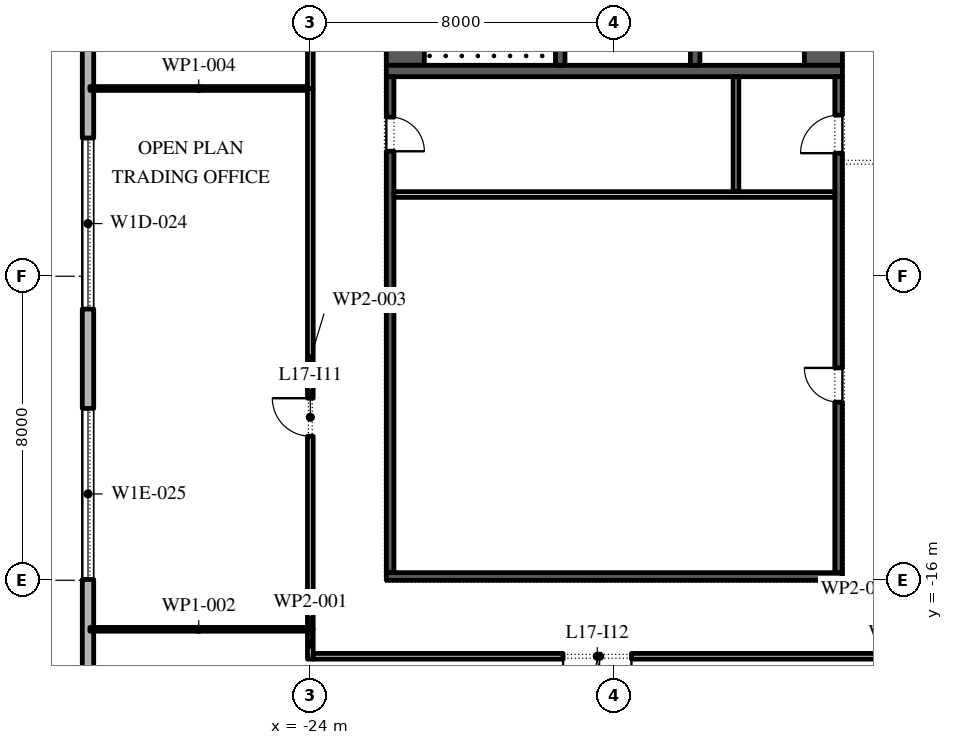
"""IFC4 building model, lengths in metres.
Left out: names, types, materials, properties, quantities, classifications, styles, units other than length and angle.
Written with IfcOpenShell. Run it as: python <this file> out.ifc"""

import sys

from ifc_helpers import new_model, si_unit, direction, frame, frame_2d, origin, place, context, subcontext, project, spatial, rectangle, extrude, element, fill, save


model = new_model("IFC4")
c1 = context("Model", 3, precision=1e-05, world=origin(), true_north=direction((0.0, 1.0)))
c2 = subcontext(c1, "Body", "Model", "MODEL_VIEW")
j1 = project(units=[si_unit("LENGTHUNIT", "METRE"), si_unit("PLANEANGLEUNIT", "RADIAN")], contexts=[c1])
p1 = place(None, origin())
s1 = spatial("IfcSite", under=j1, at=p1, CompositionType="ELEMENT")
p2 = place(p1, origin())
s2 = spatial("IfcBuilding", under=s1, at=p2, CompositionType="ELEMENT")
p3 = place(p2, frame((0.0, 0.0, 81.6)))
s3 = spatial("IfcBuildingStorey", under=s2, at=p3, CompositionType="ELEMENT", Elevation=81.6)
p4 = place(p3, frame((-29.85, 25.1, 0.0), z_axis=(0.0, 0.0, 1.0), x_axis=(0.0, -1.0, 0.0)))
e1 = element("IfcWall", 1, at=p4, inside=s3, PredefinedType="STANDARD", context=c2, shape_type="SweptSolid", body=[
    extrude(rectangle(XDim=49.5, YDim=0.3, at=frame_2d((24.75, 0.0))), origin(), (0.0, 0.0, 1.0), 4.0),
])
p5 = place(p4, frame((1.157, 0.0, 0.45)))
e2 = element("IfcOpeningElement", 2, at=p5, cuts=e1, PredefinedType="OPENING", context=c2, shape_type="SweptSolid", body=[
    extrude(rectangle(XDim=4.5, YDim=2.875, at=frame_2d((2.25, 1.438))), frame((0.0, 0.16, 0.0), z_axis=(0.0, -1.0, 0.0), x_axis=(1.0, 0.0, 0.0)), (0.0, 0.0, 1.0), 0.32),
])
p6 = place(p4, frame((8.121, 0.0, 0.45)))
e3 = element("IfcOpeningElement", 3, at=p6, cuts=e1, PredefinedType="OPENING", context=c2, shape_type="SweptSolid", body=[
    extrude(rectangle(XDim=4.5, YDim=3.05, at=frame_2d((2.25, 1.525))), frame((0.0, 0.16, 0.0), z_axis=(0.0, -1.0, 0.0), x_axis=(1.0, 0.0, 0.0)), (0.0, 0.0, 1.0), 0.32),
])
p7 = place(p4, frame((16.286, 0.0, 0.0)))
e4 = element("IfcOpeningElement", 4, at=p7, cuts=e1, PredefinedType="OPENING", context=c2, shape_type="SweptSolid", body=[
    extrude(rectangle(XDim=2.4, YDim=3.325, at=frame_2d((1.2, 1.663))), frame((0.0, 0.16, 0.0), z_axis=(0.0, -1.0, 0.0), x_axis=(1.0, 0.0, 0.0)), (0.0, 0.0, 1.0), 0.32),
])
p8 = place(p4, frame((22.35, 0.0, 0.45)))
e5 = element("IfcOpeningElement", 5, at=p8, cuts=e1, PredefinedType="OPENING", context=c2, shape_type="SweptSolid", body=[
    extrude(rectangle(XDim=4.5, YDim=2.875, at=frame_2d((2.25, 1.438))), frame((0.0, 0.16, 0.0), z_axis=(0.0, -1.0, 0.0), x_axis=(1.0, 0.0, 0.0)), (0.0, 0.0, 1.0), 0.32),
])
p9 = place(p4, frame((29.464, 0.0, 0.45)))
e6 = element("IfcOpeningElement", 6, at=p9, cuts=e1, PredefinedType="OPENING", context=c2, shape_type="SweptSolid", body=[
    extrude(rectangle(XDim=4.5, YDim=2.875, at=frame_2d((2.25, 1.438))), frame((0.0, 0.16, 0.0), z_axis=(0.0, -1.0, 0.0), x_axis=(1.0, 0.0, 0.0)), (0.0, 0.0, 1.0), 0.32),
])
p10 = place(p4, frame((36.579, 0.0, 0.45)))
e7 = element("IfcOpeningElement", 7, at=p10, cuts=e1, PredefinedType="OPENING", context=c2, shape_type="SweptSolid", body=[
    extrude(rectangle(XDim=4.5, YDim=2.825, at=frame_2d((2.25, 1.413))), frame((0.0, 0.16, 0.0), z_axis=(0.0, -1.0, 0.0), x_axis=(1.0, 0.0, 0.0)), (0.0, 0.0, 1.0), 0.32),
])
p11 = place(p4, frame((44.743, 0.0, 0.0)))
e8 = element("IfcOpeningElement", 8, at=p11, cuts=e1, PredefinedType="OPENING", context=c2, shape_type="SweptSolid", body=[
    extrude(rectangle(XDim=2.4, YDim=3.5, at=frame_2d((1.2, 1.75))), frame((0.0, 0.16, 0.0), z_axis=(0.0, -1.0, 0.0), x_axis=(1.0, 0.0, 0.0)), (0.0, 0.0, 1.0), 0.32),
])
p12 = place(p3, frame((-21.5, -2.45, 0.0), z_axis=(0.0, 0.0, 1.0), x_axis=(0.0, 1.0, 0.0)))
e9 = element("IfcWall", 9, at=p12, inside=s3, PredefinedType="SHEAR", context=c2, shape_type="SweptSolid", body=[
    extrude(rectangle(XDim=27.9, YDim=1.0, at=frame_2d((13.95, 0.0))), origin(), (0.0, 0.0, 1.0), 4.0),
])
p13 = place(p12, frame((5.05, 0.0, 0.0)))
e10 = element("IfcOpeningElement", 10, at=p13, cuts=e9, PredefinedType="OPENING", context=c2, shape_type="SweptSolid", body=[
    extrude(rectangle(XDim=1.2, YDim=2.1, at=frame_2d((0.6, 1.05))), frame((0.0, 0.51, 0.0), z_axis=(0.0, -1.0, 0.0), x_axis=(1.0, 0.0, 0.0)), (0.0, 0.0, 1.0), 1.02),
])
p14 = place(p12, frame((21.65, 0.0, 0.0)))
e11 = element("IfcOpeningElement", 11, at=p14, cuts=e9, PredefinedType="OPENING", context=c2, shape_type="SweptSolid", body=[
    extrude(rectangle(XDim=1.2, YDim=2.1, at=frame_2d((0.6, 1.05))), frame((0.0, 0.51, 0.0), z_axis=(0.0, -1.0, 0.0), x_axis=(1.0, 0.0, 0.0)), (0.0, 0.0, 1.0), 1.02),
])
p15 = place(p3, frame((-10.5, -2.45, 0.0), z_axis=(0.0, 0.0, 1.0), x_axis=(0.0, 1.0, 0.0)))
e12 = element("IfcWall", 12, at=p15, inside=s3, PredefinedType="SHEAR", context=c2, shape_type="SweptSolid", body=[
    extrude(rectangle(XDim=27.9, YDim=1.0, at=frame_2d((13.95, 0.0))), origin(), (0.0, 0.0, 1.0), 4.0),
])
p16 = place(p15, frame((23.65, 0.0, 0.0)))
e13 = element("IfcOpeningElement", 13, at=p16, cuts=e12, PredefinedType="OPENING", context=c2, shape_type="SweptSolid", body=[
    extrude(rectangle(XDim=2.4, YDim=2.1, at=frame_2d((1.2, 1.05))), frame((0.0, 0.51, 0.0), z_axis=(0.0, -1.0, 0.0), x_axis=(1.0, 0.0, 0.0)), (0.0, 0.0, 1.0), 1.02),
])
p17 = place(p15, frame((1.387, 0.0, 0.0)))
e14 = element("IfcOpeningElement", 14, at=p17, cuts=e12, PredefinedType="OPENING", context=c2, shape_type="SweptSolid", body=[
    extrude(rectangle(XDim=0.9, YDim=2.1, at=frame_2d((0.45, 1.05))), frame((0.0, 0.51, 0.0), z_axis=(0.0, -1.0, 0.0), x_axis=(1.0, 0.0, 0.0)), (0.0, 0.0, 1.0), 1.02),
])
p18 = place(p15, frame((4.613, 0.0, 0.0)))
e15 = element("IfcOpeningElement", 15, at=p18, cuts=e12, PredefinedType="OPENING", context=c2, shape_type="SweptSolid", body=[
    extrude(rectangle(XDim=0.9, YDim=2.1, at=frame_2d((0.45, 1.05))), frame((0.0, 0.51, 0.0), z_axis=(0.0, -1.0, 0.0), x_axis=(1.0, 0.0, 0.0)), (0.0, 0.0, 1.0), 1.02),
])
p19 = place(p3, frame((-22.0, -2.6, 0.0), z_axis=(0.0, 0.0, 1.0), x_axis=(1.0, 0.0, 0.0)))
e16 = element("IfcWall", 16, at=p19, inside=s3, PredefinedType="SHEAR", context=c2, shape_type="SweptSolid", body=[
    extrude(rectangle(XDim=12.0, YDim=0.3, at=frame_2d((6.0, 0.0))), origin(), (0.0, 0.0, 1.0), 4.0),
])
p20 = place(p3, frame((-17.425, -2.45, 0.0), z_axis=(0.0, 0.0, 1.0), x_axis=(0.0, 1.0, 0.0)))
e17 = element("IfcWall", 17, at=p20, inside=s3, PredefinedType="SHEAR", context=c2, shape_type="SweptSolid", body=[
    extrude(rectangle(XDim=6.3, YDim=0.25, at=frame_2d((3.15, 0.0))), origin(), (0.0, 0.0, 1.0), 4.0),
])
p21 = place(p20, frame((5.05, 0.0, 0.0)))
e18 = element("IfcOpeningElement", 18, at=p21, cuts=e17, PredefinedType="OPENING", context=c2, shape_type="SweptSolid", body=[
    extrude(rectangle(XDim=1.2, YDim=2.1, at=frame_2d((0.6, 1.05))), frame((0.0, 0.135, 0.0), z_axis=(0.0, -1.0, 0.0), x_axis=(1.0, 0.0, 0.0)), (0.0, 0.0, 1.0), 0.27),
])
p22 = place(p3, frame((-13.875, -2.45, 0.0), z_axis=(0.0, 0.0, 1.0), x_axis=(0.0, 1.0, 0.0)))
e19 = element("IfcWall", 19, at=p22, inside=s3, PredefinedType="SHEAR", context=c2, shape_type="SweptSolid", body=[
    extrude(rectangle(XDim=21.3, YDim=0.25, at=frame_2d((10.65, 0.0))), origin(), (0.0, 0.0, 1.0), 4.0),
])
p23 = place(p22, frame((11.446, 0.0, 0.0)))
e20 = element("IfcOpeningElement", 20, at=p23, cuts=e19, PredefinedType="OPENING", context=c2, shape_type="SweptSolid", body=[
    extrude(rectangle(XDim=0.9, YDim=2.1, at=frame_2d((0.45, 1.05))), frame((0.0, 0.135, 0.0), z_axis=(0.0, -1.0, 0.0), x_axis=(1.0, 0.0, 0.0)), (0.0, 0.0, 1.0), 0.27),
])
p24 = place(p22, frame((17.725, 0.0, 0.0)))
e21 = element("IfcOpeningElement", 21, at=p24, cuts=e19, PredefinedType="OPENING", context=c2, shape_type="SweptSolid", body=[
    extrude(rectangle(XDim=0.9, YDim=2.1, at=frame_2d((0.45, 1.05))), frame((0.0, 0.135, 0.0), z_axis=(0.0, -1.0, 0.0), x_axis=(1.0, 0.0, 0.0)), (0.0, 0.0, 1.0), 0.27),
])
p25 = place(p22, frame((6.971, 0.0, 0.0)))
e22 = element("IfcOpeningElement", 22, at=p25, cuts=e19, PredefinedType="OPENING", context=c2, shape_type="SweptSolid", body=[
    extrude(rectangle(XDim=1.1, YDim=2.1, at=frame_2d((0.55, 1.05))), frame((0.0, 0.135, 0.0), z_axis=(0.0, -1.0, 0.0), x_axis=(1.0, 0.0, 0.0)), (0.0, 0.0, 1.0), 0.27),
])
p26 = place(p3, frame((-21.9, -15.8, 0.0), z_axis=(0.0, 0.0, 1.0), x_axis=(0.0, 1.0, 0.0)))
e23 = element("IfcWall", 23, at=p26, inside=s3, PredefinedType="SHEAR", context=c2, shape_type="SweptSolid", body=[
    extrude(rectangle(XDim=13.05, YDim=0.2, at=frame_2d((6.525, 0.0))), origin(), (0.0, 0.0, 1.0), 4.0),
])
p27 = place(p26, frame((11.087, 0.0, 0.0)))
e24 = element("IfcOpeningElement", 24, at=p27, cuts=e23, PredefinedType="OPENING", context=c2, shape_type="SweptSolid", body=[
    extrude(rectangle(XDim=0.9, YDim=2.1, at=frame_2d((0.45, 1.05))), frame((0.0, 0.11, 0.0), z_axis=(0.0, -1.0, 0.0), x_axis=(1.0, 0.0, 0.0)), (0.0, 0.0, 1.0), 0.22),
])
p28 = place(p3, frame((-10.1, -15.8, 0.0), z_axis=(0.0, 0.0, 1.0), x_axis=(0.0, 1.0, 0.0)))
e25 = element("IfcWall", 25, at=p28, inside=s3, PredefinedType="SHEAR", context=c2, shape_type="SweptSolid", body=[
    extrude(rectangle(XDim=13.05, YDim=0.2, at=frame_2d((6.525, 0.0))), origin(), (0.0, 0.0, 1.0), 4.0),
])
p29 = place(p28, frame((4.488, 0.0, 0.0)))
e26 = element("IfcOpeningElement", 26, at=p29, cuts=e25, PredefinedType="OPENING", context=c2, shape_type="SweptSolid", body=[
    extrude(rectangle(XDim=0.9, YDim=2.1, at=frame_2d((0.45, 1.05))), frame((0.0, 0.11, 0.0), z_axis=(0.0, -1.0, 0.0), x_axis=(1.0, 0.0, 0.0)), (0.0, 0.0, 1.0), 0.22),
])
p30 = place(p28, frame((11.038, 0.0, 0.0)))
e27 = element("IfcOpeningElement", 27, at=p30, cuts=e25, PredefinedType="OPENING", context=c2, shape_type="SweptSolid", body=[
    extrude(rectangle(XDim=1.0, YDim=2.1, at=frame_2d((0.5, 1.05))), frame((0.0, 0.11, 0.0), z_axis=(0.0, -1.0, 0.0), x_axis=(1.0, 0.0, 0.0)), (0.0, 0.0, 1.0), 0.22),
])
p31 = place(p3, frame((-22.0, -15.9, 0.0), z_axis=(0.0, 0.0, 1.0), x_axis=(1.0, 0.0, 0.0)))
e28 = element("IfcWall", 28, at=p31, inside=s3, PredefinedType="SHEAR", context=c2, shape_type="SweptSolid", body=[
    extrude(rectangle(XDim=12.0, YDim=0.2, at=frame_2d((6.0, 0.0))), origin(), (0.0, 0.0, 1.0), 4.0),
])
p32 = place(p3, frame((-21.8, -5.85, 0.0), z_axis=(0.0, 0.0, 1.0), x_axis=(1.0, 0.0, 0.0)))
e29 = element("IfcWall", 29, at=p32, inside=s3, PredefinedType="PARTITIONING", context=c2, shape_type="SweptSolid", body=[
    extrude(rectangle(XDim=11.6, YDim=0.15, at=frame_2d((5.8, 0.0))), origin(), (0.0, 0.0, 1.0), 4.0),
])
p33 = place(p3, frame((-12.8, -5.775, 0.0), z_axis=(0.0, 0.0, 1.0), x_axis=(0.0, 1.0, 0.0)))
e30 = element("IfcWall", 30, at=p33, inside=s3, PredefinedType="PARTITIONING", context=c2, shape_type="SweptSolid", body=[
    extrude(rectangle(XDim=3.025, YDim=0.15, at=frame_2d((1.512, 0.0))), origin(), (0.0, 0.0, 1.0), 4.0),
])
p34 = place(p3, frame((-24.0, -18.075, 0.0), z_axis=(0.0, 0.0, 1.0), x_axis=(0.0, 1.0, 0.0)))
e31 = element("IfcWall", 31, at=p34, inside=s3, PredefinedType="PARTITIONING", context=c2, shape_type="SweptSolid", body=[
    extrude(rectangle(XDim=0.785, YDim=0.15, at=frame_2d((0.393, 0.0))), origin(), (0.0, 0.0, 1.0), 4.0),
])
p35 = place(p3, frame((-24.075, -17.29, 0.0), z_axis=(0.0, 0.0, 1.0), x_axis=(-1.0, 0.0, 0.0)))
e32 = element("IfcWall", 32, at=p35, inside=s3, PredefinedType="PARTITIONING", context=c2, shape_type="SweptSolid", body=[
    extrude(rectangle(XDim=5.725, YDim=0.1, at=frame_2d((2.863, 0.0))), origin(), (0.0, 0.0, 1.0), 4.0),
])
p36 = place(p3, frame((-24.0, -17.29, 0.0), z_axis=(0.0, 0.0, 1.0), x_axis=(0.0, 1.0, 0.0)))
e33 = element("IfcWall", 33, at=p36, inside=s3, PredefinedType="PARTITIONING", context=c2, shape_type="SweptSolid", body=[
    extrude(rectangle(XDim=14.23, YDim=0.15, at=frame_2d((7.115, 0.0))), origin(), (0.0, 0.0, 1.0), 4.0),
])
p37 = place(p36, frame((5.08, 0.0, 0.0)))
e34 = element("IfcOpeningElement", 34, at=p37, cuts=e33, PredefinedType="OPENING", context=c2, shape_type="SweptSolid", body=[
    extrude(rectangle(XDim=1.0, YDim=2.1, at=frame_2d((0.5, 1.05))), frame((0.0, 0.085, 0.0), z_axis=(0.0, -1.0, 0.0), x_axis=(1.0, 0.0, 0.0)), (0.0, 0.0, 1.0), 0.17),
])
p38 = place(p3, frame((-24.075, -3.06, 0.0), z_axis=(0.0, 0.0, 1.0), x_axis=(-1.0, 0.0, 0.0)))
e35 = element("IfcWall", 35, at=p38, inside=s3, PredefinedType="PARTITIONING", context=c2, shape_type="SweptSolid", body=[
    extrude(rectangle(XDim=5.725, YDim=0.1, at=frame_2d((2.863, 0.0))), origin(), (0.0, 0.0, 1.0), 4.0),
])
p39 = place(p3, frame((-24.0, -3.06, 0.0), z_axis=(0.0, 0.0, 1.0), x_axis=(0.0, 1.0, 0.0)))
e36 = element("IfcWall", 36, at=p39, inside=s3, PredefinedType="PARTITIONING", context=c2, shape_type="SweptSolid", body=[
    extrude(rectangle(XDim=30.345, YDim=0.15, at=frame_2d((15.172, 0.0))), origin(), (0.0, 0.0, 1.0), 4.0),
])
p40 = place(p39, frame((17.62, 0.0, 0.0)))
e37 = element("IfcOpeningElement", 37, at=p40, cuts=e36, PredefinedType="OPENING", context=c2, shape_type="SweptSolid", body=[
    extrude(rectangle(XDim=1.0, YDim=2.1, at=frame_2d((0.5, 1.05))), frame((0.0, 0.085, 0.0), z_axis=(0.0, -1.0, 0.0), x_axis=(1.0, 0.0, 0.0)), (0.0, 0.0, 1.0), 0.17),
])
p41 = place(p3, frame((-8.85, -18.0, 0.0), z_axis=(0.0, 0.0, 1.0), x_axis=(-1.0, 0.0, 0.0)))
e38 = element("IfcWall", 38, at=p41, inside=s3, PredefinedType="PARTITIONING", context=c2, shape_type="SweptSolid", body=[
    extrude(rectangle(XDim=15.075, YDim=0.15, at=frame_2d((7.538, 0.0))), origin(), (0.0, 0.0, 1.0), 4.0),
])
p42 = place(p41, frame((6.7, 0.0, 0.0)))
e39 = element("IfcOpeningElement", 39, at=p42, cuts=e38, PredefinedType="OPENING", context=c2, shape_type="SweptSolid", body=[
    extrude(rectangle(XDim=1.8, YDim=2.1, at=frame_2d((0.9, 1.05))), frame((0.0, 0.085, 0.0), z_axis=(0.0, -1.0, 0.0), x_axis=(1.0, 0.0, 0.0)), (0.0, 0.0, 1.0), 0.17),
])
p43 = place(p9, origin())
e40 = element("IfcWindow", 40, at=p43, inside=s3, PartitioningType="DOUBLE_PANEL_VERTICAL", PredefinedType="WINDOW", context=c2, shape_type="SweptSolid", body=[
    extrude(rectangle(XDim=4.5, YDim=2.875, at=frame_2d((2.25, 1.438))), frame((0.0, 0.03, 0.0), z_axis=(0.0, -1.0, 0.0), x_axis=(1.0, 0.0, 0.0)), (0.0, 0.0, 1.0), 0.06),
])
fill(e6, e40)
p44 = place(p10, origin())
e41 = element("IfcWindow", 41, at=p44, inside=s3, PartitioningType="DOUBLE_PANEL_VERTICAL", PredefinedType="WINDOW", context=c2, shape_type="SweptSolid", body=[
    extrude(rectangle(XDim=4.5, YDim=2.825, at=frame_2d((2.25, 1.413))), frame((0.0, 0.03, 0.0), z_axis=(0.0, -1.0, 0.0), x_axis=(1.0, 0.0, 0.0)), (0.0, 0.0, 1.0), 0.06),
])
fill(e7, e41)
p45 = place(p29, origin())
e42 = element("IfcDoor", 42, at=p45, inside=s3, OperationType="SINGLE_SWING_LEFT", PredefinedType="DOOR", context=c2, shape_type="SweptSolid", body=[
    extrude(rectangle(XDim=0.9, YDim=2.1, at=frame_2d((0.45, 1.05))), frame((0.0, 0.1, 0.0), z_axis=(0.0, -1.0, 0.0), x_axis=(1.0, 0.0, 0.0)), (0.0, 0.0, 1.0), 0.05),
])
fill(e26, e42)
p46 = place(p30, origin())
e43 = element("IfcDoor", 43, at=p46, inside=s3, OperationType="SINGLE_SWING_RIGHT", PredefinedType="DOOR", context=c2, shape_type="SweptSolid", body=[
    extrude(rectangle(XDim=1.0, YDim=2.1, at=frame_2d((0.5, 1.05))), frame((0.0, 0.1, 0.0), z_axis=(0.0, -1.0, 0.0), x_axis=(1.0, 0.0, 0.0)), (0.0, 0.0, 1.0), 0.05),
])
fill(e27, e43)
p47 = place(p27, frame((0.9, -0.15, 0.0), z_axis=(0.0, 0.0, 1.0), x_axis=(-1.0, 0.0, 0.0)))
e44 = element("IfcDoor", 44, at=p47, inside=s3, OperationType="SINGLE_SWING_LEFT", PredefinedType="DOOR", context=c2, shape_type="SweptSolid", body=[
    extrude(rectangle(XDim=0.9, YDim=2.1, at=frame_2d((0.45, 1.05))), frame((0.0, -0.05, 0.0), z_axis=(0.0, -1.0, 0.0), x_axis=(1.0, 0.0, 0.0)), (0.0, 0.0, 1.0), 0.05),
])
fill(e24, e44)
p48 = place(p37, origin())
e45 = element("IfcDoor", 45, at=p48, inside=s3, OperationType="SINGLE_SWING_LEFT", PredefinedType="DOOR", context=c2, shape_type="SweptSolid", body=[
    extrude(rectangle(XDim=1.0, YDim=2.1, at=frame_2d((0.5, 1.05))), frame((0.0, 0.025, 0.0), z_axis=(0.0, -1.0, 0.0), x_axis=(1.0, 0.0, 0.0)), (0.0, 0.0, 1.0), 0.05),
])
fill(e34, e45)
p49 = place(p42, origin())
e46 = element("IfcDoor", 46, at=p49, inside=s3, OperationType="SINGLE_SWING_LEFT", PredefinedType="DOOR", context=c2, shape_type="SweptSolid", body=[
    extrude(rectangle(XDim=1.8, YDim=2.1, at=frame_2d((0.9, 1.05))), frame((0.0, 0.025, 0.0), z_axis=(0.0, -1.0, 0.0), x_axis=(1.0, 0.0, 0.0)), (0.0, 0.0, 1.0), 0.05),
])
fill(e39, e46)
save(model, sys.argv[1])
